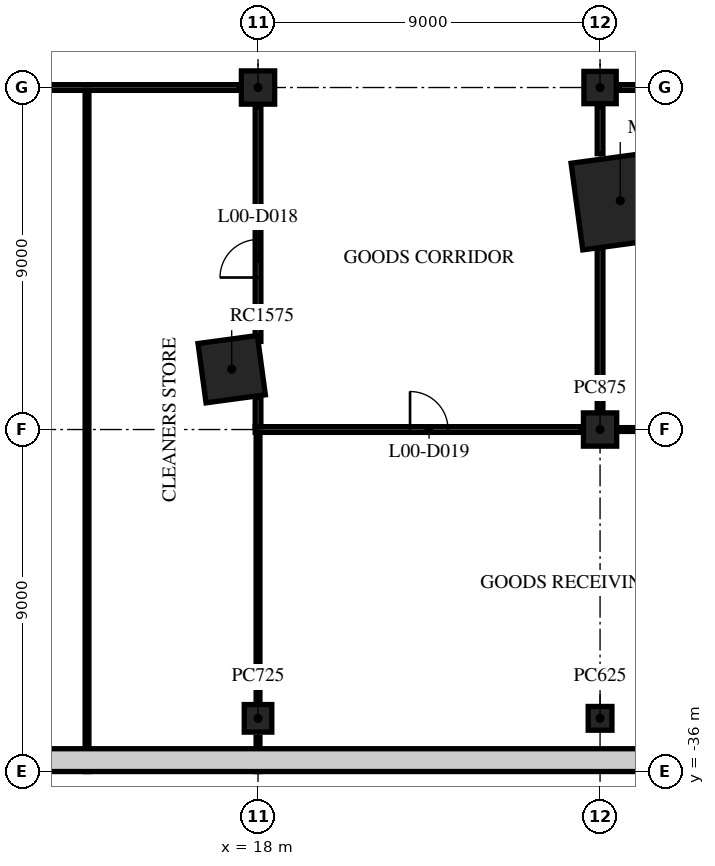
"""IFC4 building model, lengths in metres.
Left out: names, types, materials, properties, quantities, classifications, styles, units other than length and angle.
Written with IfcOpenShell. Run it as: python <this file> out.ifc"""

import sys

from ifc_helpers import new_model, si_unit, direction, frame, frame_2d, origin, origin_2d, place, context, subcontext, project, spatial, rectangle, extrude, element, fill, save


model = new_model("IFC4")
c1 = context("Model", 3, precision=1e-05, world=origin(), true_north=direction((0.0, 1.0)))
c2 = subcontext(c1, "Body", "Model", "MODEL_VIEW")
j1 = project(units=[si_unit("LENGTHUNIT", "METRE"), si_unit("PLANEANGLEUNIT", "RADIAN")], contexts=[c1])
p1 = place(None, origin())
s1 = spatial("IfcSite", under=j1, at=p1, CompositionType="ELEMENT")
p2 = place(p1, origin())
s2 = spatial("IfcBuilding", under=s1, at=p2, CompositionType="ELEMENT")
p3 = place(p2, origin())
s3 = spatial("IfcBuildingStorey", under=s2, at=p3, CompositionType="ELEMENT", Elevation=0.0)
p4 = place(p3, frame((18.0, -34.6, 0.0), z_axis=(0.0, 0.0, 1.0), x_axis=(1.0, 0.0, 0.0)))
e1 = element("IfcColumn", 1, at=p4, inside=s3, PredefinedType="COLUMN", context=c2, shape_type="SweptSolid", body=[
    extrude(rectangle(XDim=0.725, YDim=0.725, at=origin_2d()), origin(), (0.0, 0.0, 1.0), 4.5),
])
p5 = place(p3, frame((18.0, -18.0, 0.0), z_axis=(0.0, 0.0, 1.0), x_axis=(1.0, 0.0, 0.0)))
e2 = element("IfcColumn", 2, at=p5, inside=s3, PredefinedType="COLUMN", context=c2, shape_type="SweptSolid", body=[
    extrude(rectangle(XDim=0.875, YDim=0.875, at=origin_2d()), origin(), (0.0, 0.0, 1.0), 4.5),
])
p6 = place(p3, frame((27.0, -34.6, 0.0), z_axis=(0.0, 0.0, 1.0), x_axis=(1.0, 0.0, 0.0)))
e3 = element("IfcColumn", 3, at=p6, inside=s3, PredefinedType="COLUMN", context=c2, shape_type="SweptSolid", body=[
    extrude(rectangle(XDim=0.625, YDim=0.625, at=origin_2d()), origin(), (0.0, 0.0, 1.0), 4.5),
])
p7 = place(p3, frame((27.0, -27.0, 0.0), z_axis=(0.0, 0.0, 1.0), x_axis=(1.0, 0.0, 0.0)))
e4 = element("IfcColumn", 4, at=p7, inside=s3, PredefinedType="COLUMN", context=c2, shape_type="SweptSolid", body=[
    extrude(rectangle(XDim=0.875, YDim=0.875, at=origin_2d()), origin(), (0.0, 0.0, 1.0), 4.5),
])
p8 = place(p3, frame((27.0, -18.0, 0.0), z_axis=(0.0, 0.0, 1.0), x_axis=(1.0, 0.0, 0.0)))
e5 = element("IfcColumn", 5, at=p8, inside=s3, PredefinedType="COLUMN", context=c2, shape_type="SweptSolid", body=[
    extrude(rectangle(XDim=0.85, YDim=0.85, at=origin_2d()), origin(), (0.0, 0.0, 1.0), 4.5),
])
p9 = place(p3, frame((17.307, -25.412, 0.0), z_axis=(0.0, 0.0, 1.0), x_axis=(0.991001197216, 0.133853005627, 0.0)))
e6 = element("IfcColumn", 6, at=p9, inside=s3, PredefinedType="COLUMN", context=c2, shape_type="SweptSolid", body=[
    extrude(rectangle(XDim=1.575, YDim=1.575, at=origin_2d()), origin(), (0.0, 0.0, 1.0), 4.5),
])
p10 = place(p3, frame((27.531, -20.979, 0.0), z_axis=(0.0, 0.0, 1.0), x_axis=(0.991001197216, 0.133853005627, 0.0)))
e7 = element("IfcColumn", 7, at=p10, inside=s3, PredefinedType="COLUMN", context=c2, shape_type="SweptSolid", body=[
    extrude(rectangle(XDim=2.3, YDim=2.3, at=origin_2d()), origin(), (0.0, 0.0, 1.0), 4.5),
])
p11 = place(p3, frame((17.925, -27.0, 0.0), z_axis=(0.0, 0.0, 1.0), x_axis=(1.0, 0.0, 0.0)))
e8 = element("IfcWall", 8, at=p11, inside=s3, PredefinedType="PARTITIONING", context=c2, shape_type="SweptSolid", body=[
    extrude(rectangle(XDim=8.575, YDim=0.15, at=frame_2d((4.288, 0.0))), origin(), (0.0, 0.0, 1.0), 4.1),
])
p12 = place(p11, frame((4.075, 0.0, 0.0)))
e9 = element("IfcOpeningElement", 9, at=p12, cuts=e8, PredefinedType="OPENING", context=c2, shape_type="SweptSolid", body=[
    extrude(rectangle(XDim=1.0, YDim=2.1, at=frame_2d((0.5, 1.05))), frame((0.0, 0.085, 0.0), z_axis=(0.0, -1.0, 0.0), x_axis=(1.0, 0.0, 0.0)), (0.0, 0.0, 1.0), 0.17),
])
p13 = place(p3, frame((27.5, -27.0, 0.0), z_axis=(0.0, 0.0, 1.0), x_axis=(1.0, 0.0, 0.0)))
e10 = element("IfcWall", 10, at=p13, inside=s3, PredefinedType="PARTITIONING", context=c2, shape_type="SweptSolid", body=[
    extrude(rectangle(XDim=6.6, YDim=0.1, at=frame_2d((3.3, 0.0))), origin(), (0.0, 0.0, 1.0), 4.1),
])
p14 = place(p3, frame((9.5, -18.0, 0.0), z_axis=(0.0, 0.0, 1.0), x_axis=(1.0, 0.0, 0.0)))
e11 = element("IfcWall", 11, at=p14, inside=s3, PredefinedType="PARTITIONING", context=c2, shape_type="SweptSolid", body=[
    extrude(rectangle(XDim=8.0, YDim=0.15, at=frame_2d((4.0, 0.0))), origin(), (0.0, 0.0, 1.0), 4.1),
])
p15 = place(p3, frame((27.5, -18.0, 0.0), z_axis=(0.0, 0.0, 1.0), x_axis=(1.0, 0.0, 0.0)))
e12 = element("IfcWall", 12, at=p15, inside=s3, PredefinedType="PARTITIONING", context=c2, shape_type="SweptSolid", body=[
    extrude(rectangle(XDim=6.6, YDim=0.15, at=frame_2d((3.3, 0.0))), origin(), (0.0, 0.0, 1.0), 4.1),
])
p16 = place(p15, frame((3.5, 0.0, 0.0)))
e13 = element("IfcOpeningElement", 13, at=p16, cuts=e12, PredefinedType="OPENING", context=c2, shape_type="SweptSolid", body=[
    extrude(rectangle(XDim=1.0, YDim=2.1, at=frame_2d((0.5, 1.05))), frame((0.0, 0.085, 0.0), z_axis=(0.0, -1.0, 0.0), x_axis=(1.0, 0.0, 0.0)), (0.0, 0.0, 1.0), 0.17),
])
p17 = place(p3, frame((13.5, -36.0, 0.0), z_axis=(0.0, 0.0, 1.0), x_axis=(0.0, 1.0, 0.0)))
e14 = element("IfcWall", 14, at=p17, inside=s3, PredefinedType="PARTITIONING", context=c2, shape_type="SweptSolid", body=[
    extrude(rectangle(XDim=17.925, YDim=0.1, at=frame_2d((8.962, 0.0))), origin(), (0.0, 0.0, 1.0), 4.1),
])
p18 = place(p3, frame((18.0, -36.0, 0.0), z_axis=(0.0, 0.0, 1.0), x_axis=(0.0, 1.0, 0.0)))
e15 = element("IfcWall", 15, at=p18, inside=s3, PredefinedType="PARTITIONING", context=c2, shape_type="SweptSolid", body=[
    extrude(rectangle(XDim=0.9, YDim=0.1, at=frame_2d((0.45, 0.0))), origin(), (0.0, 0.0, 1.0), 4.1),
])
p19 = place(p3, frame((18.0, -34.1, 0.0), z_axis=(0.0, 0.0, 1.0), x_axis=(0.0, 1.0, 0.0)))
e16 = element("IfcWall", 16, at=p19, inside=s3, PredefinedType="PARTITIONING", context=c2, shape_type="SweptSolid", body=[
    extrude(rectangle(XDim=7.025, YDim=0.1, at=frame_2d((3.513, 0.0))), origin(), (0.0, 0.0, 1.0), 4.1),
])
p20 = place(p3, frame((18.0, -26.925, 0.0), z_axis=(0.0, 0.0, 1.0), x_axis=(0.0, 1.0, 0.0)))
e17 = element("IfcWall", 17, at=p20, inside=s3, PredefinedType="PARTITIONING", context=c2, shape_type="SweptSolid", body=[
    extrude(rectangle(XDim=0.782, YDim=0.15, at=frame_2d((0.391, 0.0))), origin(), (0.0, 0.0, 1.0), 4.1),
])
p21 = place(p3, frame((18.0, -24.681, 0.0), z_axis=(0.0, 0.0, 1.0), x_axis=(0.0, 1.0, 0.0)))
e18 = element("IfcWall", 18, at=p21, inside=s3, PredefinedType="PARTITIONING", context=c2, shape_type="SweptSolid", body=[
    extrude(rectangle(XDim=6.181, YDim=0.15, at=frame_2d((3.09, 0.0))), origin(), (0.0, 0.0, 1.0), 4.1),
])
p22 = place(p21, frame((1.681, 0.0, 0.0)))
e19 = element("IfcOpeningElement", 19, at=p22, cuts=e18, PredefinedType="OPENING", context=c2, shape_type="SweptSolid", body=[
    extrude(rectangle(XDim=1.0, YDim=2.1, at=frame_2d((0.5, 1.05))), frame((0.0, 0.085, 0.0), z_axis=(0.0, -1.0, 0.0), x_axis=(1.0, 0.0, 0.0)), (0.0, 0.0, 1.0), 0.17),
])
p23 = place(p3, frame((27.0, -26.5, 0.0), z_axis=(0.0, 0.0, 1.0), x_axis=(0.0, 1.0, 0.0)))
e20 = element("IfcWall", 20, at=p23, inside=s3, PredefinedType="PARTITIONING", context=c2, shape_type="SweptSolid", body=[
    extrude(rectangle(XDim=4.284, YDim=0.15, at=frame_2d((2.142, 0.0))), origin(), (0.0, 0.0, 1.0), 4.1),
])
p24 = place(p3, frame((27.0, -19.742, 0.0), z_axis=(0.0, 0.0, 1.0), x_axis=(0.0, 1.0, 0.0)))
e21 = element("IfcWall", 21, at=p24, inside=s3, PredefinedType="PARTITIONING", context=c2, shape_type="SweptSolid", body=[
    extrude(rectangle(XDim=1.242, YDim=0.15, at=frame_2d((0.621, 0.0))), origin(), (0.0, 0.0, 1.0), 4.1),
])
for number, where, z_axis, x_axis in (
    (22, (19.667, -36.45, -0.2), (0.0, 0.0, 1.0), (1.0, 0.0, 0.0)),
    (23, (27.683, -36.45, -0.2), (0.0, 0.0, 1.0), (1.0, 0.0, 0.0)),
):
    element("IfcColumn", number, at=place(p3, frame(where, z_axis=z_axis, x_axis=x_axis)), inside=s3, PredefinedType="COLUMN", context=c2, shape_type="SweptSolid", body=[
        extrude(rectangle(XDim=0.6, YDim=0.6, at=origin_2d()), origin(), (0.0, 0.0, 1.0), 4.7),
    ])
p25 = place(p3, frame((11.95, -36.45, -0.2), z_axis=(0.0, 0.0, 1.0), x_axis=(1.0, 0.0, 0.0)))
e24 = element("IfcWall", 24, at=p25, inside=s3, PredefinedType="SOLIDWALL", context=c2, shape_type="SweptSolid", body=[
    extrude(rectangle(XDim=7.417, YDim=0.6, at=frame_2d((3.708, 0.0))), origin(), (0.0, 0.0, 1.0), 4.7),
])
p26 = place(p3, frame((19.967, -36.45, -0.2), z_axis=(0.0, 0.0, 1.0), x_axis=(1.0, 0.0, 0.0)))
e25 = element("IfcWall", 25, at=p26, inside=s3, PredefinedType="SOLIDWALL", context=c2, shape_type="SweptSolid", body=[
    extrude(rectangle(XDim=7.417, YDim=0.6, at=frame_2d((3.708, 0.0))), origin(), (0.0, 0.0, 1.0), 4.7),
])
p27 = place(p3, frame((-30.876, -35.7, 0.0), z_axis=(0.0, 0.0, 1.0), x_axis=(1.0, 0.0, 0.0)))
e26 = element("IfcWall", 26, at=p27, inside=s3, PredefinedType="STANDARD", context=c2, shape_type="SweptSolid", body=[
    extrude(rectangle(XDim=61.751, YDim=0.6, at=frame_2d((30.876, 0.0))), origin(), (0.0, 0.0, 1.0), 4.1),
])
p28 = place(p22, origin())
e27 = element("IfcDoor", 27, at=p28, inside=s3, OperationType="SINGLE_SWING_RIGHT", PredefinedType="DOOR", context=c2, shape_type="SweptSolid", body=[
    extrude(rectangle(XDim=1.0, YDim=2.1, at=frame_2d((0.5, 1.05))), frame((0.0, 0.025, 0.0), z_axis=(0.0, -1.0, 0.0), x_axis=(1.0, 0.0, 0.0)), (0.0, 0.0, 1.0), 0.05),
])
fill(e19, e27)
p29 = place(p12, origin())
e28 = element("IfcDoor", 28, at=p29, inside=s3, OperationType="SINGLE_SWING_LEFT", PredefinedType="DOOR", context=c2, shape_type="SweptSolid", body=[
    extrude(rectangle(XDim=1.0, YDim=2.1, at=frame_2d((0.5, 1.05))), frame((0.0, 0.025, 0.0), z_axis=(0.0, -1.0, 0.0), x_axis=(1.0, 0.0, 0.0)), (0.0, 0.0, 1.0), 0.05),
])
fill(e9, e28)
save(model, sys.argv[1])
